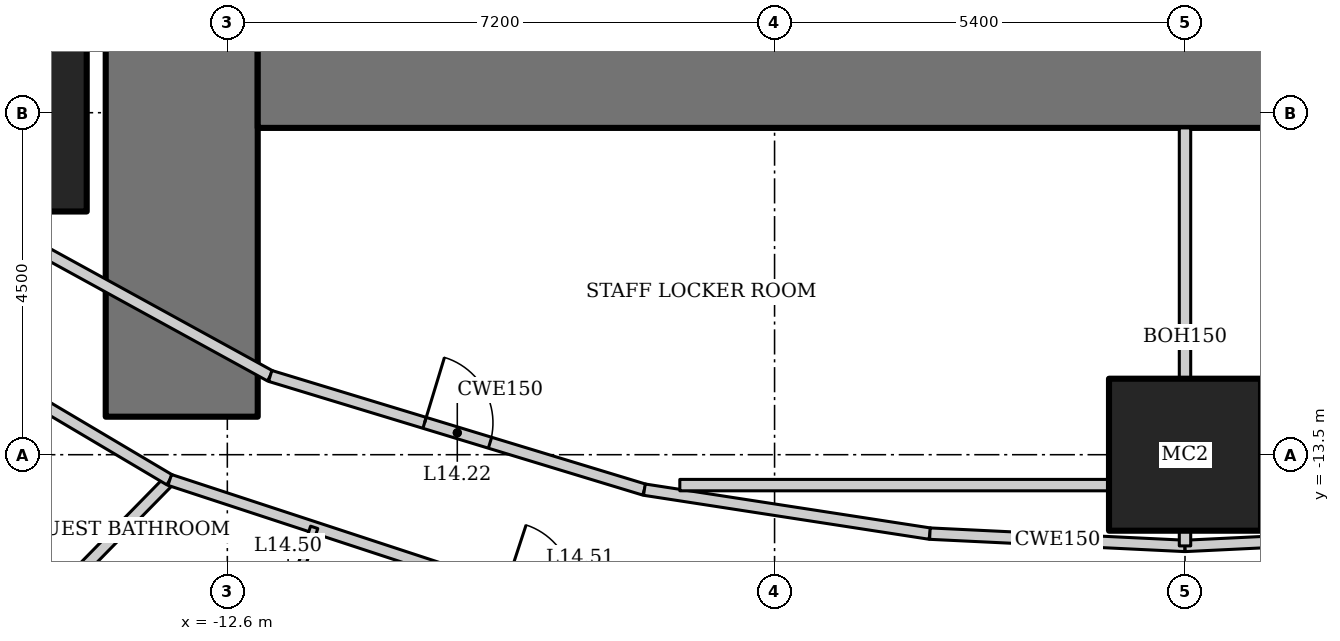
"""IFC4 building model, lengths in metres.
Left out: names, types, materials, properties, quantities, classifications, styles, units other than length and angle.
Written with IfcOpenShell. Run it as: python <this file> out.ifc"""

import sys

from ifc_helpers import new_model, si_unit, direction, frame, frame_2d, origin, origin_2d, place, context, subcontext, project, spatial, rectangle, hollow_rectangle, extrude, element, fill, save


model = new_model("IFC4")
c1 = context("Model", 3, precision=1e-05, world=origin(), true_north=direction((0.0, 1.0)))
c2 = subcontext(c1, "Body", "Model", "MODEL_VIEW")
j1 = project(units=[si_unit("LENGTHUNIT", "METRE"), si_unit("PLANEANGLEUNIT", "RADIAN")], contexts=[c1])
p1 = place(None, origin())
s1 = spatial("IfcSite", under=j1, at=p1, CompositionType="ELEMENT")
p2 = place(p1, origin())
s2 = spatial("IfcBuilding", under=s1, at=p2, CompositionType="ELEMENT")
p3 = place(p2, frame((0.0, 0.0, 65.8)))
s3 = spatial("IfcBuildingStorey", under=s2, at=p3, CompositionType="ELEMENT", Elevation=65.8)
p4 = place(p3, frame((-15.75, -9.0, 0.0), z_axis=(0.0, 0.0, 1.0), x_axis=(1.0, 0.0, 0.0)))
e1 = element("IfcColumn", 1, at=p4, inside=s3, PredefinedType="COLUMN", context=c2, shape_type="SweptSolid", body=[
    extrude(hollow_rectangle(XDim=2.6, YDim=2.6, WallThickness=0.13, at=origin_2d()), origin(), (0.0, 0.0, 1.0), 3.6),
])
p5 = place(p3, frame((0.0, -13.5, 0.0), z_axis=(0.0, 0.0, 1.0), x_axis=(1.0, 0.0, 0.0)))
e2 = element("IfcColumn", 2, at=p5, inside=s3, PredefinedType="COLUMN", context=c2, shape_type="SweptSolid", body=[
    extrude(hollow_rectangle(XDim=2.0, YDim=2.0, WallThickness=0.17, at=origin_2d()), origin(), (0.0, 0.0, 1.0), 3.6),
])
p6 = place(p3, frame((-13.2, 13.0, 0.0), z_axis=(0.0, 0.0, 1.0), x_axis=(0.0, -1.0, 0.0)))
e3 = element("IfcWall", 3, at=p6, inside=s3, PredefinedType="SHEAR", context=c2, shape_type="SweptSolid", body=[
    extrude(rectangle(XDim=26.0, YDim=2.0, at=frame_2d((13.0, 0.0))), origin(), (0.0, 0.0, 1.0), 3.6),
])
p7 = place(p6, frame((12.1, 0.0, 0.0)))
e4 = element("IfcOpeningElement", 4, at=p7, cuts=e3, PredefinedType="OPENING", context=c2, shape_type="SweptSolid", body=[
    extrude(rectangle(XDim=1.8, YDim=2.1, at=frame_2d((0.9, 1.05))), frame((0.0, 1.01, 0.0), z_axis=(0.0, -1.0, 0.0), x_axis=(1.0, 0.0, 0.0)), (0.0, 0.0, 1.0), 2.02),
])
p8 = place(p3, frame((-12.2, -8.0, 0.0), z_axis=(0.0, 0.0, 1.0), x_axis=(1.0, 0.0, 0.0)))
e5 = element("IfcWall", 5, at=p8, inside=s3, PredefinedType="SHEAR", context=c2, shape_type="SweptSolid", body=[
    extrude(rectangle(XDim=24.4, YDim=2.4, at=frame_2d((12.2, 0.0))), origin(), (0.0, 0.0, 1.0), 3.6),
])
p9 = place(p3, frame((-17.97, -18.542, 0.0), z_axis=(0.0, 0.0, 1.0), x_axis=(0.699736251994, 0.714401272147, 0.0)))
e6 = element("IfcWall", 6, at=p9, inside=s3, PredefinedType="PARTITIONING", context=c2, shape_type="SweptSolid", body=[
    extrude(rectangle(XDim=6.593, YDim=0.15, at=frame_2d((3.296, 0.0))), origin(), (0.0, 0.0, 1.0), 2.528),
])
p10 = place(p3, frame((-18.681, -10.675, 0.0), z_axis=(0.0, 0.0, 1.0), x_axis=(0.860147339762, -0.510045639036, 0.0)))
e7 = element("IfcWall", 7, at=p10, inside=s3, PredefinedType="PARTITIONING", context=c2, shape_type="SweptSolid", body=[
    extrude(rectangle(XDim=6.19, YDim=0.15, at=frame_2d((3.095, 0.0))), origin(), (0.0, 0.0, 1.0), 3.45),
])
p11 = place(p10, frame((2.505, 0.0, 0.0)))
e8 = element("IfcOpeningElement", 8, at=p11, cuts=e7, PredefinedType="OPENING", context=c2, shape_type="SweptSolid", body=[
    extrude(rectangle(XDim=0.9, YDim=2.1, at=frame_2d((0.45, 1.05))), frame((0.0, 0.085, 0.0), z_axis=(0.0, -1.0, 0.0), x_axis=(1.0, 0.0, 0.0)), (0.0, 0.0, 1.0), 0.17),
])
p12 = place(p3, frame((-13.357, -13.832, 0.0), z_axis=(0.0, 0.0, 1.0), x_axis=(0.950106803111, -0.311924770869, 0.0)))
e9 = element("IfcWall", 9, at=p12, inside=s3, PredefinedType="PARTITIONING", context=c2, shape_type="SweptSolid", body=[
    extrude(rectangle(XDim=5.689, YDim=0.15, at=frame_2d((2.845, 0.0))), origin(), (0.0, 0.0, 1.0), 3.45),
])
p13 = place(p12, frame((4.639, 0.0, 0.0)))
e10 = element("IfcOpeningElement", 10, at=p13, cuts=e9, PredefinedType="OPENING", context=c2, shape_type="SweptSolid", body=[
    extrude(rectangle(XDim=0.9, YDim=2.1, at=frame_2d((0.45, 1.05))), frame((0.0, 0.085, 0.0), z_axis=(0.0, -1.0, 0.0), x_axis=(1.0, 0.0, 0.0)), (0.0, 0.0, 1.0), 0.17),
])
p14 = place(p3, frame((-17.021, -9.726, 0.0), z_axis=(0.0, 0.0, 1.0), x_axis=(0.876522084062, -0.481361647986, 0.0)))
e11 = element("IfcWall", 11, at=p14, inside=s3, PredefinedType="PARTITIONING", context=c2, shape_type="SweptSolid", body=[
    extrude(rectangle(XDim=5.687, YDim=0.15, at=frame_2d((2.844, 0.0))), origin(), (0.0, 0.0, 1.0), 3.45),
])
p15 = place(p3, frame((-12.036, -12.464, 0.0), z_axis=(0.0, 0.0, 1.0), x_axis=(0.956795045135, -0.290763205385, 0.0)))
e12 = element("IfcWall", 12, at=p15, inside=s3, PredefinedType="PARTITIONING", context=c2, shape_type="SweptSolid", body=[
    extrude(rectangle(XDim=5.146, YDim=0.15, at=frame_2d((2.573, 0.0))), origin(), (0.0, 0.0, 1.0), 3.45),
])
p16 = place(p15, frame((2.123, 0.0, 0.0)))
e13 = element("IfcOpeningElement", 13, at=p16, cuts=e12, PredefinedType="OPENING", context=c2, shape_type="SweptSolid", body=[
    extrude(rectangle(XDim=0.9, YDim=2.1, at=frame_2d((0.45, 1.05))), frame((0.0, 0.085, 0.0), z_axis=(0.0, -1.0, 0.0), x_axis=(1.0, 0.0, 0.0)), (0.0, 0.0, 1.0), 0.17),
])
p17 = place(p3, frame((-7.113, -13.96, 0.0), z_axis=(0.0, 0.0, 1.0), x_axis=(0.988343461108, -0.152240608529, 0.0)))
e14 = element("IfcWall", 14, at=p17, inside=s3, PredefinedType="PARTITIONING", context=c2, shape_type="SweptSolid", body=[
    extrude(rectangle(XDim=3.801, YDim=0.15, at=frame_2d((1.9, 0.0))), origin(), (0.0, 0.0, 1.0), 3.45),
])
for number, where, z_axis, x_axis in (
    (15, (-3.356, -14.538, 0.0), (0.0, 0.0, 1.0), (0.999, -0.048, 0.0)),
    (16, (0.0, -14.7, 0.0), (0.0, 0.0, 1.0), (0.999, 0.048, 0.0)),
):
    element("IfcWall", number, at=place(p3, frame(where, z_axis=z_axis, x_axis=x_axis)), inside=s3, PredefinedType="PARTITIONING", context=c2, shape_type="SweptSolid", body=[
        extrude(rectangle(XDim=3.36, YDim=0.15, at=frame_2d((1.68, 0.0))), origin(), (0.0, 0.0, 1.0), 3.45),
    ])
p18 = place(p3, frame((0.0, -9.2, 0.0), z_axis=(0.0, 0.0, 1.0), x_axis=(0.0, -1.0, 0.0)))
e17 = element("IfcWall", 17, at=p18, inside=s3, PredefinedType="PARTITIONING", context=c2, shape_type="SweptSolid", body=[
    extrude(rectangle(XDim=5.5, YDim=0.15, at=frame_2d((2.75, 0.0))), origin(), (0.0, 0.0, 1.0), 2.924),
])
p19 = place(p3, frame((-6.647, -13.9, 0.0), z_axis=(0.0, 0.0, 1.0), x_axis=(1.0, 0.0, 0.0)))
e18 = element("IfcWall", 18, at=p19, inside=s3, PredefinedType="PARTITIONING", context=c2, shape_type="SweptSolid", body=[
    extrude(rectangle(XDim=6.647, YDim=0.15, at=frame_2d((3.323, 0.0))), origin(), (0.0, 0.0, 1.0), 3.45),
])
p20 = place(p3, frame((0.0, -14.4, 0.0), z_axis=(0.0, 0.0, 1.0), x_axis=(1.0, 0.0, 0.0)))
e19 = element("IfcWall", 19, at=p20, inside=s3, PredefinedType="PARTITIONING", context=c2, shape_type="SweptSolid", body=[
    extrude(rectangle(XDim=3.401, YDim=0.15, at=frame_2d((1.701, 0.0))), origin(), (0.0, 0.0, 1.0), 3.45),
])
p21 = place(p3, frame((-11.457, -14.456, 0.0), z_axis=(0.0, 0.0, 1.0), x_axis=(-0.311890952591, -0.950117905153, 0.0)))
e20 = element("IfcWall", 20, at=p21, inside=s3, PredefinedType="PARTITIONING", context=c2, shape_type="SweptSolid", body=[
    extrude(rectangle(XDim=2.4, YDim=0.1, at=frame_2d((1.2, 0.0))), origin(), (0.0, 0.0, 1.0), 3.45),
])
p22 = place(p21, frame((0.7, 0.0, 0.0)))
e21 = element("IfcOpeningElement", 21, at=p22, cuts=e20, PredefinedType="OPENING", context=c2, shape_type="SweptSolid", body=[
    extrude(rectangle(XDim=0.8, YDim=2.1, at=frame_2d((0.4, 1.05))), frame((0.0, 0.06, 0.0), z_axis=(0.0, -1.0, 0.0), x_axis=(1.0, 0.0, 0.0)), (0.0, 0.0, 1.0), 0.12),
])
p23 = place(p16, origin())
e22 = element("IfcDoor", 22, at=p23, inside=s3, OperationType="SINGLE_SWING_LEFT", PredefinedType="DOOR", context=c2, shape_type="SweptSolid", body=[
    extrude(rectangle(XDim=0.9, YDim=2.1, at=frame_2d((0.45, 1.05))), frame((0.0, 0.025, 0.0), z_axis=(0.0, -1.0, 0.0), x_axis=(1.0, 0.0, 0.0)), (0.0, 0.0, 1.0), 0.05),
])
fill(e13, e22)
save(model, sys.argv[1])
